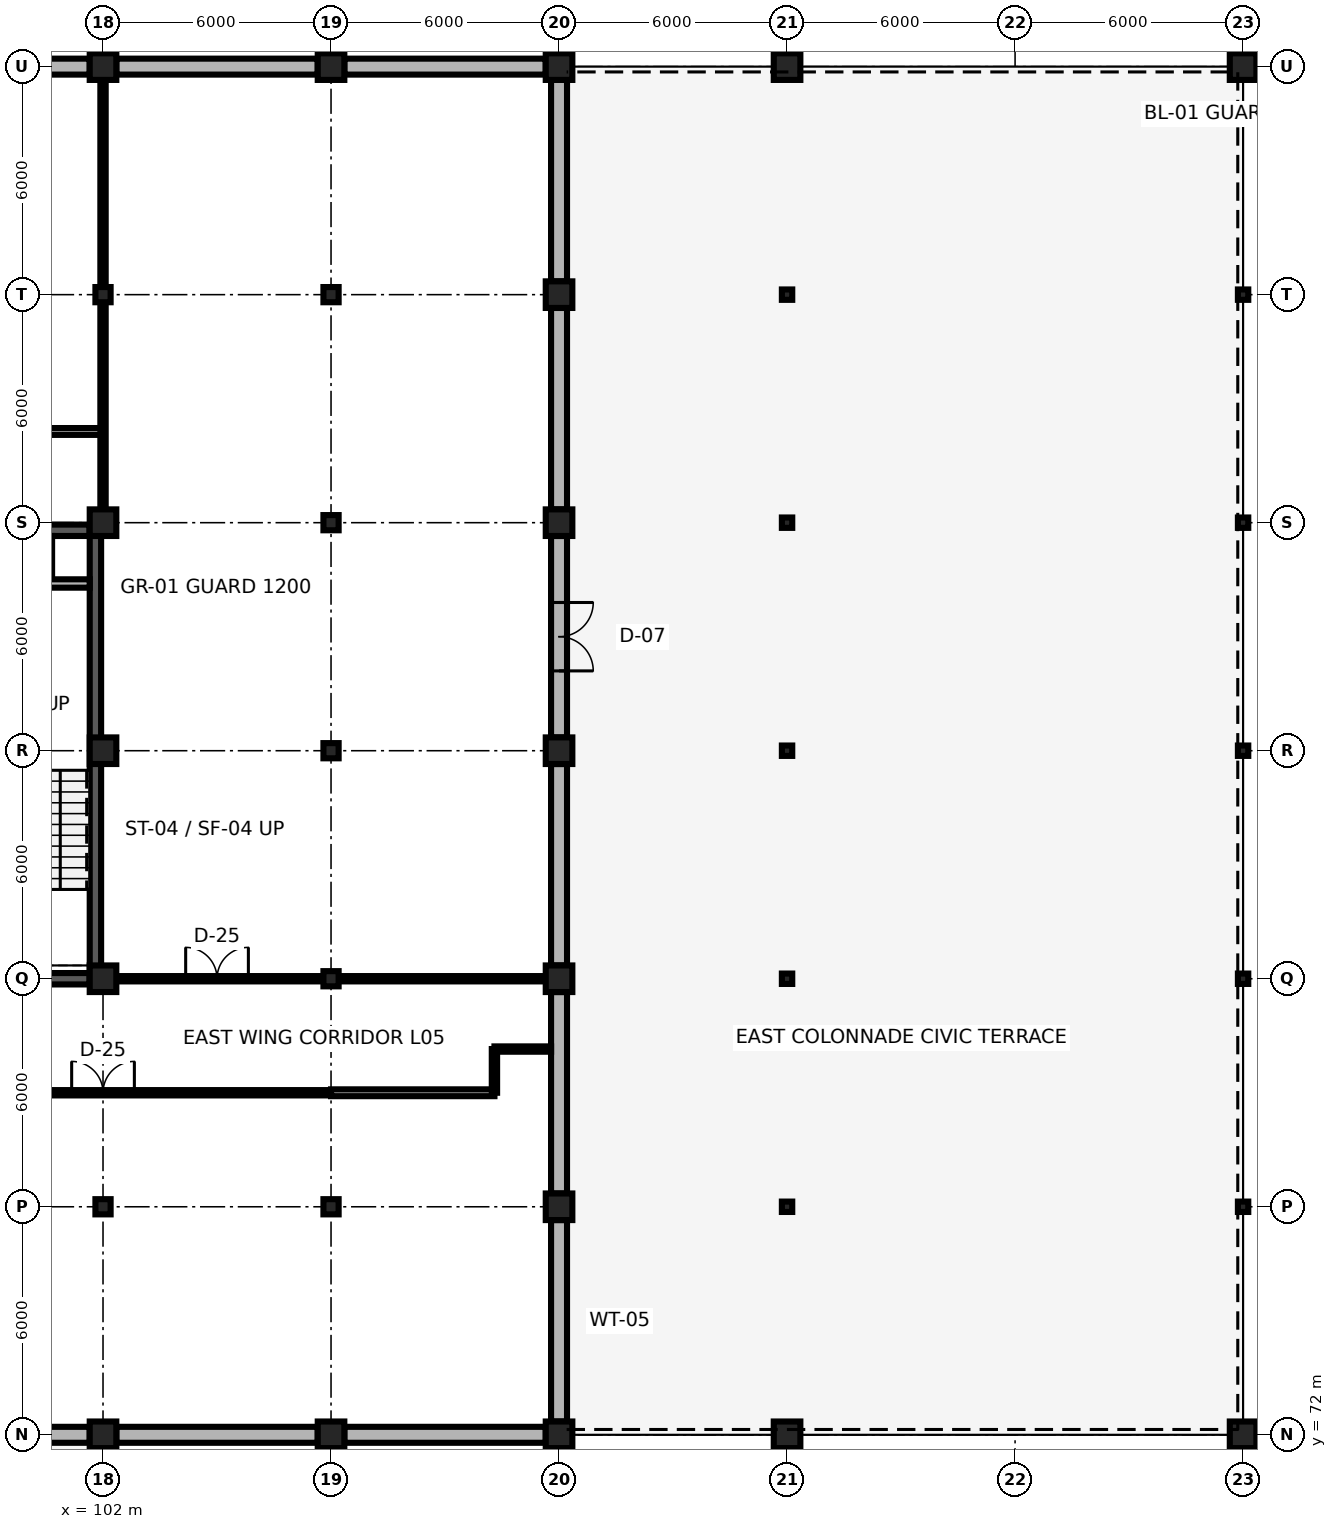
"""IFC4 building model, lengths in metres.
Left out: names, types, materials, properties, quantities, classifications, styles, units other than length and angle.
Written with IfcOpenShell. Run it as: python <this file> out.ifc"""

import sys

from ifc_helpers import new_model, si_unit, direction, frame, frame_2d, origin, origin_2d, place, context, subcontext, project, spatial, rectangle, hollow_circle, i_section, extrude, element, fill, save


model = new_model("IFC4")
c1 = context("Model", 3, precision=1e-05, world=origin(), true_north=direction((0.0, 1.0)))
c2 = subcontext(c1, "Body", "Model", "MODEL_VIEW")
j1 = project(units=[si_unit("LENGTHUNIT", "METRE"), si_unit("PLANEANGLEUNIT", "RADIAN")], contexts=[c1])
p1 = place(None, origin())
s1 = spatial("IfcSite", under=j1, at=p1, CompositionType="ELEMENT")
p2 = place(p1, origin())
s2 = spatial("IfcBuilding", under=s1, at=p2, CompositionType="ELEMENT")
p3 = place(p2, frame((0.0, 0.0, 21.0)))
s3 = spatial("IfcBuildingStorey", under=s2, at=p3, CompositionType="ELEMENT", Elevation=21.0)
for number, where, z_axis, x_axis in (
    (1, (102.0, 72.0, 0.0), (0.0, 0.0, 1.0), (1.0, 0.0, 0.0)),
    (2, (108.0, 72.0, 0.0), (0.0, 0.0, 1.0), (1.0, 0.0, 0.0)),
    (3, (114.0, 72.0, 0.0), (0.0, 0.0, 1.0), (1.0, 0.0, 0.0)),
):
    element("IfcColumn", number, at=place(p3, frame(where, z_axis=z_axis, x_axis=x_axis)), inside=s3, PredefinedType="COLUMN", context=c2, shape_type="SweptSolid", body=[
        extrude(rectangle(XDim=0.7, YDim=0.7, at=origin_2d()), origin(), (0.0, 0.0, 1.0), 3.9),
    ])
for number, where, z_axis, x_axis in (
    (4, (120.0, 72.0, 0.0), (0.0, 0.0, 1.0), (1.0, 0.0, 0.0)),
    (5, (132.0, 72.0, 0.0), (0.0, 0.0, 1.0), (1.0, 0.0, 0.0)),
):
    element("IfcColumn", number, at=place(p3, frame(where, z_axis=z_axis, x_axis=x_axis)), inside=s3, PredefinedType="COLUMN", context=c2, shape_type="SweptSolid", body=[
        extrude(rectangle(XDim=0.7, YDim=0.7, at=origin_2d()), origin(), (0.0, 0.0, 1.0), 3.7),
    ])
for number, where, z_axis, x_axis in (
    (6, (102.0, 78.0, 0.0), (0.0, 0.0, 1.0), (1.0, 0.0, 0.0)),
    (7, (108.0, 78.0, 0.0), (0.0, 0.0, 1.0), (1.0, 0.0, 0.0)),
):
    element("IfcColumn", number, at=place(p3, frame(where, z_axis=z_axis, x_axis=x_axis)), inside=s3, PredefinedType="COLUMN", context=c2, shape_type="SweptSolid", body=[
        extrude(i_section(OverallWidth=0.4, OverallDepth=0.4, WebThickness=0.013, FlangeThickness=0.021, FilletRadius=0.022, at=origin_2d()), origin(), (0.0, 0.0, 1.0), 3.9),
    ])
p4 = place(p3, frame((114.0, 78.0, 0.0), z_axis=(0.0, 0.0, 1.0), x_axis=(1.0, 0.0, 0.0)))
e8 = element("IfcColumn", 8, at=p4, inside=s3, PredefinedType="COLUMN", context=c2, shape_type="SweptSolid", body=[
    extrude(rectangle(XDim=0.7, YDim=0.7, at=origin_2d()), origin(), (0.0, 0.0, 1.0), 3.9),
])
for number, where, z_axis, x_axis in (
    (9, (120.0, 78.0, 0.0), (0.0, 0.0, 1.0), (1.0, 0.0, 0.0)),
    (10, (132.0, 78.0, 0.0), (0.0, 0.0, 1.0), (1.0, 0.0, 0.0)),
):
    element("IfcColumn", number, at=place(p3, frame(where, z_axis=z_axis, x_axis=x_axis)), inside=s3, PredefinedType="COLUMN", context=c2, shape_type="SweptSolid", body=[
        extrude(hollow_circle(Radius=0.136, WallThickness=0.01, at=origin_2d()), origin(), (0.0, 0.0, 1.0), 3.7),
    ])
p5 = place(p3, frame((102.0, 84.0, 0.0), z_axis=(0.0, 0.0, 1.0), x_axis=(1.0, 0.0, 0.0)))
e11 = element("IfcColumn", 11, at=p5, inside=s3, PredefinedType="COLUMN", context=c2, shape_type="SweptSolid", body=[
    extrude(rectangle(XDim=0.7, YDim=0.7, at=origin_2d()), origin(), (0.0, 0.0, 1.0), 3.9),
])
p6 = place(p3, frame((108.0, 84.0, 0.0), z_axis=(0.0, 0.0, 1.0), x_axis=(1.0, 0.0, 0.0)))
e12 = element("IfcColumn", 12, at=p6, inside=s3, PredefinedType="COLUMN", context=c2, shape_type="SweptSolid", body=[
    extrude(i_section(OverallWidth=0.4, OverallDepth=0.4, WebThickness=0.013, FlangeThickness=0.021, FilletRadius=0.022, at=origin_2d()), origin(), (0.0, 0.0, 1.0), 3.9),
])
p7 = place(p3, frame((114.0, 84.0, 0.0), z_axis=(0.0, 0.0, 1.0), x_axis=(1.0, 0.0, 0.0)))
e13 = element("IfcColumn", 13, at=p7, inside=s3, PredefinedType="COLUMN", context=c2, shape_type="SweptSolid", body=[
    extrude(rectangle(XDim=0.7, YDim=0.7, at=origin_2d()), origin(), (0.0, 0.0, 1.0), 3.9),
])
for number, where, z_axis, x_axis in (
    (14, (120.0, 84.0, 0.0), (0.0, 0.0, 1.0), (1.0, 0.0, 0.0)),
    (15, (132.0, 84.0, 0.0), (0.0, 0.0, 1.0), (1.0, 0.0, 0.0)),
):
    element("IfcColumn", number, at=place(p3, frame(where, z_axis=z_axis, x_axis=x_axis)), inside=s3, PredefinedType="COLUMN", context=c2, shape_type="SweptSolid", body=[
        extrude(hollow_circle(Radius=0.136, WallThickness=0.01, at=origin_2d()), origin(), (0.0, 0.0, 1.0), 3.7),
    ])
p8 = place(p3, frame((102.0, 90.0, 0.0), z_axis=(0.0, 0.0, 1.0), x_axis=(1.0, 0.0, 0.0)))
e16 = element("IfcColumn", 16, at=p8, inside=s3, PredefinedType="COLUMN", context=c2, shape_type="SweptSolid", body=[
    extrude(rectangle(XDim=0.7, YDim=0.7, at=origin_2d()), origin(), (0.0, 0.0, 1.0), 3.9),
])
p9 = place(p3, frame((108.0, 90.0, 0.0), z_axis=(0.0, 0.0, 1.0), x_axis=(1.0, 0.0, 0.0)))
e17 = element("IfcColumn", 17, at=p9, inside=s3, PredefinedType="COLUMN", context=c2, shape_type="SweptSolid", body=[
    extrude(i_section(OverallWidth=0.4, OverallDepth=0.4, WebThickness=0.013, FlangeThickness=0.021, FilletRadius=0.022, at=origin_2d()), origin(), (0.0, 0.0, 1.0), 3.9),
])
p10 = place(p3, frame((114.0, 90.0, 0.0), z_axis=(0.0, 0.0, 1.0), x_axis=(1.0, 0.0, 0.0)))
e18 = element("IfcColumn", 18, at=p10, inside=s3, PredefinedType="COLUMN", context=c2, shape_type="SweptSolid", body=[
    extrude(rectangle(XDim=0.7, YDim=0.7, at=origin_2d()), origin(), (0.0, 0.0, 1.0), 3.9),
])
for number, where, z_axis, x_axis in (
    (19, (120.0, 90.0, 0.0), (0.0, 0.0, 1.0), (1.0, 0.0, 0.0)),
    (20, (132.0, 90.0, 0.0), (0.0, 0.0, 1.0), (1.0, 0.0, 0.0)),
):
    element("IfcColumn", number, at=place(p3, frame(where, z_axis=z_axis, x_axis=x_axis)), inside=s3, PredefinedType="COLUMN", context=c2, shape_type="SweptSolid", body=[
        extrude(hollow_circle(Radius=0.136, WallThickness=0.01, at=origin_2d()), origin(), (0.0, 0.0, 1.0), 3.7),
    ])
p11 = place(p3, frame((102.0, 96.0, 0.0), z_axis=(0.0, 0.0, 1.0), x_axis=(1.0, 0.0, 0.0)))
e21 = element("IfcColumn", 21, at=p11, inside=s3, PredefinedType="COLUMN", context=c2, shape_type="SweptSolid", body=[
    extrude(rectangle(XDim=0.7, YDim=0.7, at=origin_2d()), origin(), (0.0, 0.0, 1.0), 3.9),
])
p12 = place(p3, frame((108.0, 96.0, 0.0), z_axis=(0.0, 0.0, 1.0), x_axis=(1.0, 0.0, 0.0)))
e22 = element("IfcColumn", 22, at=p12, inside=s3, PredefinedType="COLUMN", context=c2, shape_type="SweptSolid", body=[
    extrude(i_section(OverallWidth=0.4, OverallDepth=0.4, WebThickness=0.013, FlangeThickness=0.021, FilletRadius=0.022, at=origin_2d()), origin(), (0.0, 0.0, 1.0), 3.9),
])
p13 = place(p3, frame((114.0, 96.0, 0.0), z_axis=(0.0, 0.0, 1.0), x_axis=(1.0, 0.0, 0.0)))
e23 = element("IfcColumn", 23, at=p13, inside=s3, PredefinedType="COLUMN", context=c2, shape_type="SweptSolid", body=[
    extrude(rectangle(XDim=0.7, YDim=0.7, at=origin_2d()), origin(), (0.0, 0.0, 1.0), 3.9),
])
for number, where, z_axis, x_axis in (
    (24, (120.0, 96.0, 0.0), (0.0, 0.0, 1.0), (1.0, 0.0, 0.0)),
    (25, (132.0, 96.0, 0.0), (0.0, 0.0, 1.0), (1.0, 0.0, 0.0)),
):
    element("IfcColumn", number, at=place(p3, frame(where, z_axis=z_axis, x_axis=x_axis)), inside=s3, PredefinedType="COLUMN", context=c2, shape_type="SweptSolid", body=[
        extrude(hollow_circle(Radius=0.136, WallThickness=0.01, at=origin_2d()), origin(), (0.0, 0.0, 1.0), 3.7),
    ])
for number, where, z_axis, x_axis in (
    (26, (102.0, 102.0, 0.0), (0.0, 0.0, 1.0), (1.0, 0.0, 0.0)),
    (27, (108.0, 102.0, 0.0), (0.0, 0.0, 1.0), (1.0, 0.0, 0.0)),
):
    element("IfcColumn", number, at=place(p3, frame(where, z_axis=z_axis, x_axis=x_axis)), inside=s3, PredefinedType="COLUMN", context=c2, shape_type="SweptSolid", body=[
        extrude(i_section(OverallWidth=0.4, OverallDepth=0.4, WebThickness=0.013, FlangeThickness=0.021, FilletRadius=0.022, at=origin_2d()), origin(), (0.0, 0.0, 1.0), 3.9),
    ])
p14 = place(p3, frame((114.0, 102.0, 0.0), z_axis=(0.0, 0.0, 1.0), x_axis=(1.0, 0.0, 0.0)))
e28 = element("IfcColumn", 28, at=p14, inside=s3, PredefinedType="COLUMN", context=c2, shape_type="SweptSolid", body=[
    extrude(rectangle(XDim=0.7, YDim=0.7, at=origin_2d()), origin(), (0.0, 0.0, 1.0), 3.9),
])
for number, where, z_axis, x_axis in (
    (29, (120.0, 102.0, 0.0), (0.0, 0.0, 1.0), (1.0, 0.0, 0.0)),
    (30, (132.0, 102.0, 0.0), (0.0, 0.0, 1.0), (1.0, 0.0, 0.0)),
):
    element("IfcColumn", number, at=place(p3, frame(where, z_axis=z_axis, x_axis=x_axis)), inside=s3, PredefinedType="COLUMN", context=c2, shape_type="SweptSolid", body=[
        extrude(hollow_circle(Radius=0.136, WallThickness=0.01, at=origin_2d()), origin(), (0.0, 0.0, 1.0), 3.7),
    ])
for number, where, z_axis, x_axis in (
    (31, (102.0, 108.0, 0.0), (0.0, 0.0, 1.0), (1.0, 0.0, 0.0)),
    (32, (108.0, 108.0, 0.0), (0.0, 0.0, 1.0), (1.0, 0.0, 0.0)),
    (33, (114.0, 108.0, 0.0), (0.0, 0.0, 1.0), (1.0, 0.0, 0.0)),
):
    element("IfcColumn", number, at=place(p3, frame(where, z_axis=z_axis, x_axis=x_axis)), inside=s3, PredefinedType="COLUMN", context=c2, shape_type="SweptSolid", body=[
        extrude(rectangle(XDim=0.7, YDim=0.7, at=origin_2d()), origin(), (0.0, 0.0, 1.0), 3.9),
    ])
for number, where, z_axis, x_axis in (
    (34, (120.0, 108.0, 0.0), (0.0, 0.0, 1.0), (1.0, 0.0, 0.0)),
    (35, (132.0, 108.0, 0.0), (0.0, 0.0, 1.0), (1.0, 0.0, 0.0)),
):
    element("IfcColumn", number, at=place(p3, frame(where, z_axis=z_axis, x_axis=x_axis)), inside=s3, PredefinedType="COLUMN", context=c2, shape_type="SweptSolid", body=[
        extrude(rectangle(XDim=0.7, YDim=0.7, at=origin_2d()), origin(), (0.0, 0.0, 1.0), 3.7),
    ])
for number, where, z_axis, x_axis in (
    (36, (96.35, 72.0, 0.0), (0.0, 0.0, 1.0), (1.0, 0.0, 0.0)),
    (37, (102.35, 72.0, 0.0), (0.0, 0.0, 1.0), (1.0, 0.0, 0.0)),
    (38, (108.35, 72.0, 0.0), (0.0, 0.0, 1.0), (1.0, 0.0, 0.0)),
    (39, (96.35, 108.0, 0.0), (0.0, 0.0, 1.0), (1.0, 0.0, 0.0)),
    (40, (102.35, 108.0, 0.0), (0.0, 0.0, 1.0), (1.0, 0.0, 0.0)),
    (41, (108.35, 108.0, 0.0), (0.0, 0.0, 1.0), (1.0, 0.0, 0.0)),
    (42, (114.0, 72.35, 0.0), (0.0, 0.0, 1.0), (0.0, 1.0, 0.0)),
    (43, (114.0, 78.35, 0.0), (0.0, 0.0, 1.0), (0.0, 1.0, 0.0)),
    (44, (114.0, 84.35, 0.0), (0.0, 0.0, 1.0), (0.0, 1.0, 0.0)),
):
    element("IfcWall", number, at=place(p3, frame(where, z_axis=z_axis, x_axis=x_axis)), inside=s3, PredefinedType="SOLIDWALL", context=c2, shape_type="SweptSolid", body=[
        extrude(rectangle(XDim=5.3, YDim=0.42, at=frame_2d((2.65, 0.0))), origin(), (0.0, 0.0, 1.0), 3.28),
    ])
p15 = place(p3, frame((114.0, 90.35, 0.0), z_axis=(0.0, 0.0, 1.0), x_axis=(0.0, 1.0, 0.0)))
e45 = element("IfcWall", 45, at=p15, inside=s3, PredefinedType="SOLIDWALL", context=c2, shape_type="SweptSolid", body=[
    extrude(rectangle(XDim=5.3, YDim=0.42, at=frame_2d((2.65, 0.0))), origin(), (0.0, 0.0, 1.0), 3.28),
])
p16 = place(p15, frame((1.75, 0.0, 0.0)))
e46 = element("IfcOpeningElement", 46, at=p16, cuts=e45, PredefinedType="OPENING", context=c2, shape_type="SweptSolid", body=[
    extrude(rectangle(XDim=1.8, YDim=2.5, at=frame_2d((0.9, 1.25))), frame((0.0, 0.225, 0.0), z_axis=(0.0, -1.0, 0.0), x_axis=(1.0, 0.0, 0.0)), (0.0, 0.0, 1.0), 0.45),
])
for number, where, z_axis, x_axis in (
    (47, (114.0, 96.35, 0.0), (0.0, 0.0, 1.0), (0.0, 1.0, 0.0)),
    (48, (114.0, 102.35, 0.0), (0.0, 0.0, 1.0), (0.0, 1.0, 0.0)),
):
    element("IfcWall", number, at=place(p3, frame(where, z_axis=z_axis, x_axis=x_axis)), inside=s3, PredefinedType="SOLIDWALL", context=c2, shape_type="SweptSolid", body=[
        extrude(rectangle(XDim=5.3, YDim=0.42, at=frame_2d((2.65, 0.0))), origin(), (0.0, 0.0, 1.0), 3.28),
    ])
p17 = place(p3, frame((96.35, 84.0, 0.0), z_axis=(0.0, 0.0, 1.0), x_axis=(1.0, 0.0, 0.0)))
e49 = element("IfcWall", 49, at=p17, inside=s3, PredefinedType="SHEAR", context=c2, shape_type="SweptSolid", body=[
    extrude(rectangle(XDim=5.3, YDim=0.3, at=frame_2d((2.65, 0.0))), origin(), (0.0, 0.0, 1.0), 3.66),
])
p18 = place(p17, frame((1.975, 0.0, 0.0)))
e50 = element("IfcOpeningElement", 50, at=p18, cuts=e49, PredefinedType="OPENING", context=c2, shape_type="SweptSolid", body=[
    extrude(rectangle(XDim=1.35, YDim=2.2, at=frame_2d((0.675, 1.1))), frame((0.0, 0.165, 0.0), z_axis=(0.0, -1.0, 0.0), x_axis=(1.0, 0.0, 0.0)), (0.0, 0.0, 1.0), 0.33),
])
p19 = place(p3, frame((96.35, 95.8, 0.0), z_axis=(0.0, 0.0, 1.0), x_axis=(1.0, 0.0, 0.0)))
e51 = element("IfcWall", 51, at=p19, inside=s3, PredefinedType="SHEAR", context=c2, shape_type="SweptSolid", body=[
    extrude(rectangle(XDim=5.3, YDim=0.3, at=frame_2d((2.65, 0.0))), origin(), (0.0, 0.0, 1.0), 3.74),
])
p20 = place(p3, frame((101.8, 84.0, 0.0), z_axis=(0.0, 0.0, 1.0), x_axis=(0.0, 1.0, 0.0)))
e52 = element("IfcWall", 52, at=p20, inside=s3, PredefinedType="SHEAR", context=c2, shape_type="SweptSolid", body=[
    extrude(rectangle(XDim=11.8, YDim=0.3, at=frame_2d((5.9, 0.0))), origin(), (0.0, 0.0, 1.0), 3.74),
])
p21 = place(p3, frame((100.55, 94.4, 0.0), z_axis=(0.0, 0.0, 1.0), x_axis=(0.0, 1.0, 0.0)))
e53 = element("IfcWall", 53, at=p21, inside=s3, PredefinedType="PARTITIONING", context=c2, shape_type="SweptSolid", body=[
    extrude(rectangle(XDim=1.25, YDim=0.22, at=frame_2d((0.625, 0.0))), origin(), (0.0, 0.0, 1.0), 3.74),
])
p22 = place(p3, frame((100.55, 94.4, 0.0), z_axis=(0.0, 0.0, 1.0), x_axis=(1.0, 0.0, 0.0)))
e54 = element("IfcWall", 54, at=p22, inside=s3, PredefinedType="PARTITIONING", context=c2, shape_type="SweptSolid", body=[
    extrude(rectangle(XDim=1.1, YDim=0.22, at=frame_2d((0.55, 0.0))), origin(), (0.0, 0.0, 1.0), 3.74),
])
p23 = place(p3, frame((96.0, 81.0, 0.0), z_axis=(0.0, 0.0, 1.0), x_axis=(1.0, 0.0, 0.0)))
e55 = element("IfcWall", 55, at=p23, inside=s3, PredefinedType="PARTITIONING", context=c2, shape_type="SweptSolid", body=[
    extrude(rectangle(XDim=12.0, YDim=0.14, at=frame_2d((6.0, 0.0))), origin(), (0.0, 0.0, 1.0), 3.7),
])
p24 = place(p23, frame((5.175, 0.0, 0.0)))
e56 = element("IfcOpeningElement", 56, at=p24, cuts=e55, PredefinedType="OPENING", context=c2, shape_type="SweptSolid", body=[
    extrude(rectangle(XDim=1.65, YDim=2.35, at=frame_2d((0.825, 1.175))), frame((0.0, 0.085, 0.0), z_axis=(0.0, -1.0, 0.0), x_axis=(1.0, 0.0, 0.0)), (0.0, 0.0, 1.0), 0.17),
])
p25 = place(p3, frame((102.0, 84.0, 0.0), z_axis=(0.0, 0.0, 1.0), x_axis=(1.0, 0.0, 0.0)))
e57 = element("IfcWall", 57, at=p25, inside=s3, PredefinedType="PARTITIONING", context=c2, shape_type="SweptSolid", body=[
    extrude(rectangle(XDim=6.0, YDim=0.14, at=frame_2d((3.0, 0.0))), origin(), (0.0, 0.0, 1.0), 3.312),
])
p26 = place(p25, frame((2.175, 0.0, 0.0)))
e58 = element("IfcOpeningElement", 58, at=p26, cuts=e57, PredefinedType="OPENING", context=c2, shape_type="SweptSolid", body=[
    extrude(rectangle(XDim=1.65, YDim=2.35, at=frame_2d((0.825, 1.175))), frame((0.0, 0.085, 0.0), z_axis=(0.0, -1.0, 0.0), x_axis=(1.0, 0.0, 0.0)), (0.0, 0.0, 1.0), 0.17),
])
p27 = place(p3, frame((108.0, 81.0, 0.0), z_axis=(0.0, 0.0, 1.0), x_axis=(1.0, 0.0, 0.0)))
e59 = element("IfcWall", 59, at=p27, inside=s3, PredefinedType="PARTITIONING", context=c2, shape_type="SweptSolid", body=[
    extrude(rectangle(XDim=4.3, YDim=0.18, at=frame_2d((2.15, 0.0))), origin(), (0.0, 0.0, 1.0), 3.7),
])
p28 = place(p3, frame((112.3, 81.0, 0.0), z_axis=(0.0, 0.0, 1.0), x_axis=(0.0, 1.0, 0.0)))
e60 = element("IfcWall", 60, at=p28, inside=s3, PredefinedType="PARTITIONING", context=c2, shape_type="SweptSolid", body=[
    extrude(rectangle(XDim=1.15, YDim=0.14, at=frame_2d((0.575, 0.0))), origin(), (0.0, 0.0, 1.0), 3.7),
])
p29 = place(p3, frame((112.3, 82.15, 0.0), z_axis=(0.0, 0.0, 1.0), x_axis=(1.0, 0.0, 0.0)))
e61 = element("IfcWall", 61, at=p29, inside=s3, PredefinedType="PARTITIONING", context=c2, shape_type="SweptSolid", body=[
    extrude(rectangle(XDim=1.49, YDim=0.14, at=frame_2d((0.745, 0.0))), origin(), (0.0, 0.0, 1.0), 3.7),
])
p30 = place(p3, frame((90.0, 98.4, 0.0), z_axis=(0.0, 0.0, 1.0), x_axis=(1.0, 0.0, 0.0)))
e62 = element("IfcWall", 62, at=p30, inside=s3, PredefinedType="PARTITIONING", context=c2, shape_type="SweptSolid", body=[
    extrude(rectangle(XDim=12.0, YDim=0.18, at=frame_2d((6.0, 0.0))), origin(), (0.0, 0.0, 1.0), 3.7),
])
p31 = place(p3, frame((102.0, 96.35, 0.0), z_axis=(0.0, 0.0, 1.0), x_axis=(0.0, 1.0, 0.0)))
e63 = element("IfcWall", 63, at=p31, inside=s3, PredefinedType="PARTITIONING", context=c2, shape_type="SweptSolid", body=[
    extrude(rectangle(XDim=11.3, YDim=0.14, at=frame_2d((5.65, 0.0))), origin(), (0.0, 0.0, 1.0), 3.312),
])
p32 = place(p3, frame((108.0, 84.0, 0.0), z_axis=(0.0, 0.0, 1.0), x_axis=(1.0, 0.0, 0.0)))
e64 = element("IfcWall", 64, at=p32, inside=s3, PredefinedType="PARTITIONING", context=c2, shape_type="SweptSolid", body=[
    extrude(rectangle(XDim=5.65, YDim=0.14, at=frame_2d((2.825, 0.0))), origin(), (0.0, 0.0, 1.0), 3.312),
])
p33 = place(p16, origin())
e65 = element("IfcDoor", 65, at=p33, inside=s3, OperationType="DOUBLE_DOOR_SINGLE_SWING", PredefinedType="DOOR", context=c2, shape_type="SweptSolid", body=[
    extrude(rectangle(XDim=1.8, YDim=2.5, at=frame_2d((0.9, 1.25))), frame((0.0, 0.025, 0.0), z_axis=(0.0, -1.0, 0.0), x_axis=(1.0, 0.0, 0.0)), (0.0, 0.0, 1.0), 0.05),
])
fill(e46, e65)
p34 = place(p24, origin())
e66 = element("IfcDoor", 66, at=p34, inside=s3, OperationType="DOUBLE_DOOR_SINGLE_SWING", PredefinedType="DOOR", context=c2, shape_type="SweptSolid", body=[
    extrude(rectangle(XDim=1.65, YDim=2.35, at=frame_2d((0.825, 1.175))), frame((0.0, 0.025, 0.0), z_axis=(0.0, -1.0, 0.0), x_axis=(1.0, 0.0, 0.0)), (0.0, 0.0, 1.0), 0.05),
])
fill(e56, e66)
p35 = place(p26, origin())
e67 = element("IfcDoor", 67, at=p35, inside=s3, OperationType="DOUBLE_DOOR_SINGLE_SWING", PredefinedType="DOOR", context=c2, shape_type="SweptSolid", body=[
    extrude(rectangle(XDim=1.65, YDim=2.35, at=frame_2d((0.825, 1.175))), frame((0.0, 0.025, 0.0), z_axis=(0.0, -1.0, 0.0), x_axis=(1.0, 0.0, 0.0)), (0.0, 0.0, 1.0), 0.05),
])
fill(e58, e67)
save(model, sys.argv[1])
